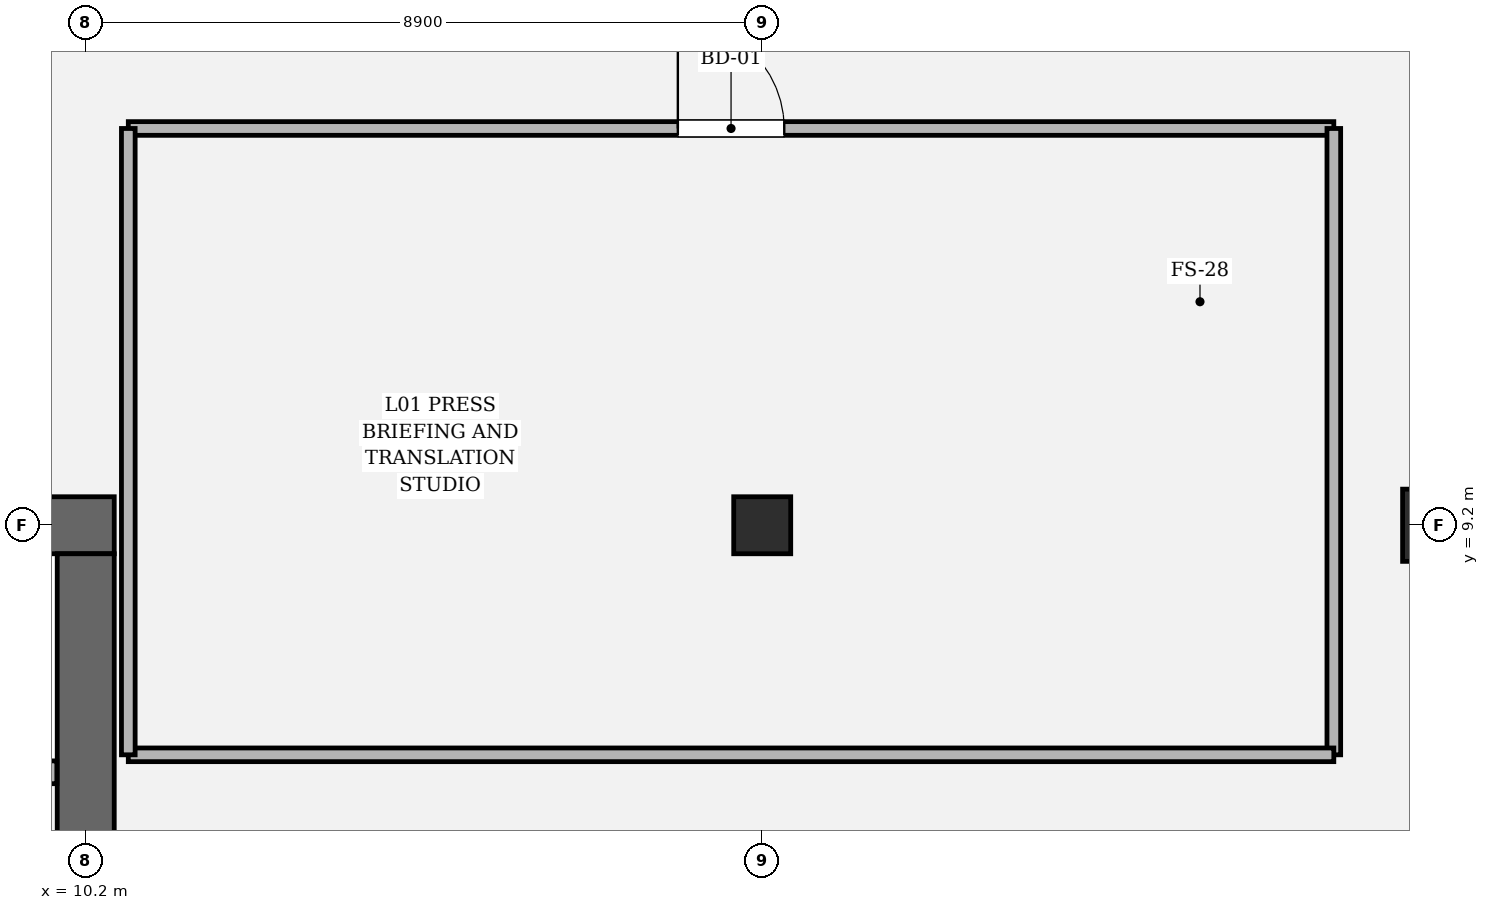
"""IFC4 building model, lengths in metres.
Left out: names, types, materials, properties, quantities, classifications, styles, units other than length and angle.
Written with IfcOpenShell. Run it as: python <this file> out.ifc"""

import sys

from ifc_helpers import new_model, si_unit, direction, frame, frame_2d, origin, origin_2d, place, context, subcontext, project, spatial, rectangle, circle, extrude, element, fill, save


model = new_model("IFC4")
c1 = context("Model", 3, precision=1e-05, world=origin(), true_north=direction((0.0, 1.0)))
c2 = subcontext(c1, "Body", "Model", "MODEL_VIEW")
j1 = project(units=[si_unit("LENGTHUNIT", "METRE"), si_unit("PLANEANGLEUNIT", "RADIAN")], contexts=[c1])
p1 = place(None, origin())
s1 = spatial("IfcSite", under=j1, at=p1, CompositionType="ELEMENT")
p2 = place(p1, origin())
s2 = spatial("IfcBuilding", under=s1, at=p2, CompositionType="ELEMENT")
p3 = place(p2, frame((0.0, 0.0, 6.0)))
s3 = spatial("IfcBuildingStorey", under=s2, at=p3, CompositionType="ELEMENT", Elevation=6.0)
p4 = place(p3, frame((-10.575, 9.2, 0.0), z_axis=(0.0, 0.0, 1.0), x_axis=(1.0, 0.0, 0.0)))
e1 = element("IfcWall", 1, at=p4, inside=s3, PredefinedType="SHEAR", context=c2, shape_type="SweptSolid", body=[
    extrude(rectangle(XDim=21.15, YDim=0.75, at=frame_2d((10.575, 0.0))), origin(), (0.0, 0.0, 1.0), 5.4),
])
p5 = place(p3, frame((10.2, 8.825, 0.0), z_axis=(0.0, 0.0, 1.0), x_axis=(0.0, -1.0, 0.0)))
e2 = element("IfcWall", 2, at=p5, inside=s3, PredefinedType="SHEAR", context=c2, shape_type="SweptSolid", body=[
    extrude(rectangle(XDim=17.65, YDim=0.75, at=frame_2d((8.825, 0.0))), origin(), (0.0, 0.0, 1.0), 5.4),
])
p6 = place(p5, frame((3.855, 0.0, 0.0)))
e3 = element("IfcOpeningElement", 3, at=p6, cuts=e2, PredefinedType="OPENING", context=c2, shape_type="SweptSolid", body=[
    extrude(rectangle(XDim=1.18, YDim=2.2, at=frame_2d((0.59, 1.1))), frame((0.0, 0.385, 0.0), z_axis=(0.0, -1.0, 0.0), x_axis=(1.0, 0.0, 0.0)), (0.0, 0.0, 1.0), 0.77),
])
p7 = place(p3, frame((28.0, 9.2, 0.0), z_axis=(0.0, 0.0, 1.0), x_axis=(1.0, 0.0, 0.0)))
e4 = element("IfcColumn", 4, at=p7, inside=s3, PredefinedType="COLUMN", context=c2, shape_type="SweptSolid", body=[
    extrude(rectangle(XDim=0.95, YDim=0.95, at=origin_2d()), origin(), (0.0, 0.0, 1.0), 5.4),
])
p8 = place(p3, frame((19.1, 9.2, 0.0), z_axis=(0.0, 0.0, 1.0), x_axis=(1.0, 0.0, 0.0)))
e5 = element("IfcColumn", 5, at=p8, inside=s3, PredefinedType="PILASTER", context=c2, shape_type="SweptSolid", body=[
    extrude(circle(Radius=0.375, at=origin_2d()), origin(), (0.0, 0.0, 1.0), 5.4),
])
p9 = place(p3, frame((5.06, 5.95, 0.0), z_axis=(0.0, 0.0, 1.0), x_axis=(1.0, 0.0, 0.0)))
e6 = element("IfcWall", 6, at=p9, inside=s3, PredefinedType="SOLIDWALL", context=c2, shape_type="SweptSolid", body=[
    extrude(rectangle(XDim=4.76, YDim=0.3, at=frame_2d((2.38, 0.0))), origin(), (0.0, 0.0, 1.0), 5.12),
])
p10 = place(p3, frame((10.76, 14.42, 0.0), z_axis=(0.0, 0.0, 1.0), x_axis=(1.0, 0.0, 0.0)))
e7 = element("IfcWall", 7, at=p10, inside=s3, PredefinedType="PARTITIONING", context=c2, shape_type="SweptSolid", body=[
    extrude(rectangle(XDim=15.86, YDim=0.18, at=frame_2d((7.93, 0.0))), origin(), (0.0, 0.0, 1.0), 4.414),
])
p11 = place(p10, frame((7.23, 0.0, 0.0)))
e8 = element("IfcOpeningElement", 8, at=p11, cuts=e7, PredefinedType="OPENING", context=c2, shape_type="SweptSolid", body=[
    extrude(rectangle(XDim=1.4, YDim=2.25, at=frame_2d((0.7, 1.125))), frame((0.0, 0.1, 0.0), z_axis=(0.0, -1.0, 0.0), x_axis=(1.0, 0.0, 0.0)), (0.0, 0.0, 1.0), 0.2),
])
p12 = place(p3, frame((26.62, 14.42, 0.0), z_axis=(0.0, 0.0, 1.0), x_axis=(0.0, -1.0, 0.0)))
e9 = element("IfcWall", 9, at=p12, inside=s3, PredefinedType="PARTITIONING", context=c2, shape_type="SweptSolid", body=[
    extrude(rectangle(XDim=8.24, YDim=0.18, at=frame_2d((4.12, 0.0))), origin(), (0.0, 0.0, 1.0), 4.414),
])
p13 = place(p3, frame((26.62, 6.18, 0.0), z_axis=(0.0, 0.0, 1.0), x_axis=(-1.0, 0.0, 0.0)))
e10 = element("IfcWall", 10, at=p13, inside=s3, PredefinedType="PARTITIONING", context=c2, shape_type="SweptSolid", body=[
    extrude(rectangle(XDim=15.86, YDim=0.18, at=frame_2d((7.93, 0.0))), origin(), (0.0, 0.0, 1.0), 4.414),
])
p14 = place(p3, frame((10.76, 6.18, 0.0), z_axis=(0.0, 0.0, 1.0), x_axis=(0.0, 1.0, 0.0)))
e11 = element("IfcWall", 11, at=p14, inside=s3, PredefinedType="PARTITIONING", context=c2, shape_type="SweptSolid", body=[
    extrude(rectangle(XDim=8.24, YDim=0.18, at=frame_2d((4.12, 0.0))), origin(), (0.0, 0.0, 1.0), 4.414),
])
p15 = place(p11, origin())
e12 = element("IfcDoor", 12, at=p15, inside=s3, OperationType="SINGLE_SWING_LEFT", PredefinedType="DOOR", context=c2, shape_type="SweptSolid", body=[
    extrude(rectangle(XDim=1.4, YDim=2.25, at=frame_2d((0.7, 1.125))), frame((0.0, 0.025, 0.0), z_axis=(0.0, -1.0, 0.0), x_axis=(1.0, 0.0, 0.0)), (0.0, 0.0, 1.0), 0.05),
])
fill(e8, e12)
save(model, sys.argv[1])
